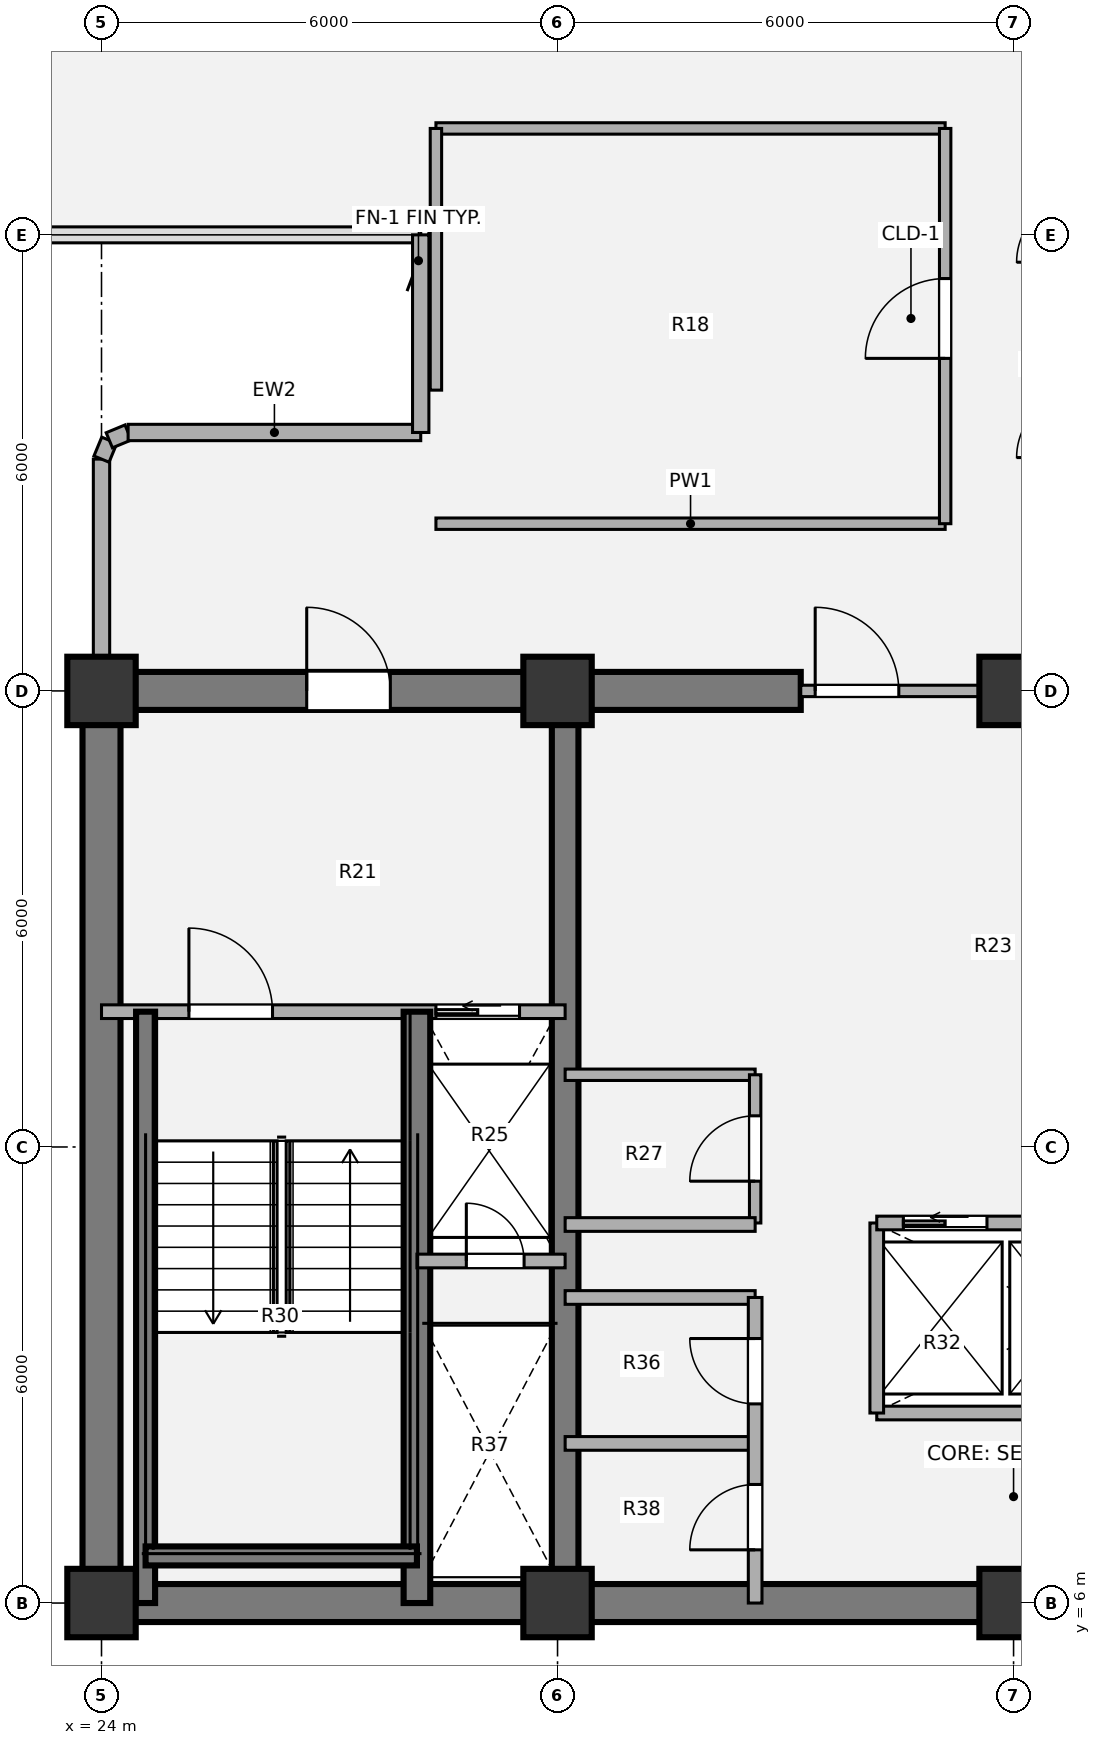
"""IFC4 building model, lengths in metres.
Left out: names, types, materials, properties, quantities, classifications, styles, units other than length and angle.
Written with IfcOpenShell. Run it as: python <this file> out.ifc"""

import sys

from ifc_helpers import new_model, si_unit, direction, frame, frame_2d, origin, origin_2d, place, context, subcontext, project, spatial, rectangle, extrude, source, transform, mapped, element, fill, save


model = new_model("IFC4")
c1 = context("Model", 3, precision=1e-05, world=origin(), true_north=direction((0.0, 1.0)))
c2 = subcontext(c1, "Body", "Model", "MODEL_VIEW")
j1 = project(units=[si_unit("LENGTHUNIT", "METRE"), si_unit("PLANEANGLEUNIT", "RADIAN")], contexts=[c1])
p1 = place(None, origin())
s1 = spatial("IfcSite", under=j1, at=p1, CompositionType="ELEMENT")
p2 = place(p1, origin())
s2 = spatial("IfcBuilding", under=s1, at=p2, CompositionType="ELEMENT")
p3 = place(p2, frame((0.0, 0.0, 142.74)))
s3 = spatial("IfcBuildingStorey", under=s2, at=p3, CompositionType="ELEMENT", Elevation=142.74)
m1 = source(origin(), c2, "Body", "SweptSolid", [
    extrude(rectangle(XDim=0.9, YDim=0.9, at=origin_2d()), origin(), (0.0, 0.0, 1.0), 3.78),
])
for number, where, z_axis, x_axis in (
    (1, (24.0, 6.0, 0.0), (0.0, 0.0, 1.0), (1.0, 0.0, 0.0)),
    (2, (30.0, 6.0, 0.0), (0.0, 0.0, 1.0), (1.0, 0.0, 0.0)),
    (3, (36.0, 6.0, 0.0), (0.0, 0.0, 1.0), (1.0, 0.0, 0.0)),
    (4, (24.0, 18.0, 0.0), (0.0, 0.0, 1.0), (1.0, 0.0, 0.0)),
    (5, (30.0, 18.0, 0.0), (0.0, 0.0, 1.0), (1.0, 0.0, 0.0)),
    (6, (36.0, 18.0, 0.0), (0.0, 0.0, 1.0), (1.0, 0.0, 0.0)),
):
    element("IfcColumn", number, at=place(p3, frame(where, z_axis=z_axis, x_axis=x_axis)), inside=s3, PredefinedType="COLUMN", context=c2, shape_type="MappedRepresentation", body=[
        mapped(m1, transform((0.0, 0.0, 0.0), x_axis=(1.0, 0.0, 0.0), y_axis=(0.0, 1.0, 0.0), z_axis=(0.0, 0.0, 1.0), scale=1.0)),
    ])
p4 = place(p3, frame((48.25, 6.0, 0.0), z_axis=(0.0, 0.0, 1.0), x_axis=(-1.0, 0.0, 0.0)))
e7 = element("IfcWall", 7, at=p4, inside=s3, PredefinedType="SHEAR", context=c2, shape_type="SweptSolid", body=[
    extrude(rectangle(XDim=24.5, YDim=0.5, at=frame_2d((12.25, 0.0))), origin(), (0.0, 0.0, 1.0), 3.78),
])
p5 = place(p3, frame((24.0, 6.0, 0.0), z_axis=(0.0, 0.0, 1.0), x_axis=(0.0, 1.0, 0.0)))
e8 = element("IfcWall", 8, at=p5, inside=s3, PredefinedType="SHEAR", context=c2, shape_type="SweptSolid", body=[
    extrude(rectangle(XDim=12.0, YDim=0.5, at=frame_2d((6.0, 0.0))), origin(), (0.0, 0.0, 1.0), 3.78),
])
p6 = place(p3, frame((23.75, 18.0, 0.0), z_axis=(0.0, 0.0, 1.0), x_axis=(1.0, 0.0, 0.0)))
e9 = element("IfcWall", 9, at=p6, inside=s3, PredefinedType="SHEAR", context=c2, shape_type="SweptSolid", body=[
    extrude(rectangle(XDim=9.45, YDim=0.5, at=frame_2d((4.725, 0.0))), origin(), (0.0, 0.0, 1.0), 3.78),
])
p7 = place(p6, frame((2.95, 0.0, 0.0)))
e10 = element("IfcOpeningElement", 10, at=p7, cuts=e9, PredefinedType="OPENING", context=c2, shape_type="SweptSolid", body=[
    extrude(rectangle(XDim=1.1, YDim=2.1, at=origin_2d()), frame((0.55, 0.26, 1.05), z_axis=(0.0, -1.0, 0.0), x_axis=(1.0, 0.0, 0.0)), (0.0, 0.0, 1.0), 0.52),
])
p8 = place(p3, frame((30.1, 6.0, 0.0), z_axis=(0.0, 0.0, 1.0), x_axis=(0.0, 1.0, 0.0)))
e11 = element("IfcWall", 11, at=p8, inside=s3, PredefinedType="SHEAR", context=c2, shape_type="SweptSolid", body=[
    extrude(rectangle(XDim=12.0, YDim=0.35, at=frame_2d((6.0, 0.0))), origin(), (0.0, 0.0, 1.0), 3.78),
])
p9 = place(p3, frame((24.0, 18.43, 0.0), z_axis=(0.0, 0.0, 1.0), x_axis=(0.0, 1.0, 0.0)))
e12 = element("IfcWall", 12, at=p9, inside=s3, PredefinedType="SOLIDWALL", context=c2, shape_type="SweptSolid", body=[
    extrude(rectangle(XDim=2.62, YDim=0.215, at=frame_2d((1.31, 0.0))), origin(), (0.0, 0.0, 1.0), 3.372),
])
p10 = place(p3, frame((24.0, 21.05, 0.0), z_axis=(0.0, 0.0, 1.0), x_axis=(0.382673670509, 0.923883575944, 0.0)))
e13 = element("IfcWall", 13, at=p10, inside=s3, PredefinedType="SOLIDWALL", context=c2, shape_type="SweptSolid", body=[
    extrude(rectangle(XDim=0.268, YDim=0.215, at=frame_2d((0.134, 0.0))), origin(), (0.0, 0.0, 1.0), 3.372),
])
p11 = place(p3, frame((24.103, 21.298, 0.0), z_axis=(0.0, 0.0, 1.0), x_axis=(0.924205486139, 0.381895560841, 0.0)))
e14 = element("IfcWall", 14, at=p11, inside=s3, PredefinedType="SOLIDWALL", context=c2, shape_type="SweptSolid", body=[
    extrude(rectangle(XDim=0.268, YDim=0.215, at=frame_2d((0.134, 0.0))), origin(), (0.0, 0.0, 1.0), 3.372),
])
p12 = place(p3, frame((24.35, 21.4, 0.0), z_axis=(0.0, 0.0, 1.0), x_axis=(1.0, 0.0, 0.0)))
e15 = element("IfcWall", 15, at=p12, inside=s3, PredefinedType="SOLIDWALL", context=c2, shape_type="SweptSolid", body=[
    extrude(rectangle(XDim=3.85, YDim=0.215, at=frame_2d((1.925, 0.0))), origin(), (0.0, 0.0, 1.0), 3.372),
])
p13 = place(p3, frame((28.2, 21.4, 0.0), z_axis=(0.0, 0.0, 1.0), x_axis=(0.0, 1.0, 0.0)))
e16 = element("IfcWall", 16, at=p13, inside=s3, PredefinedType="SOLIDWALL", context=c2, shape_type="SweptSolid", body=[
    extrude(rectangle(XDim=2.6, YDim=0.215, at=frame_2d((1.3, 0.0))), origin(), (0.0, 0.0, 1.0), 3.372),
])
p14 = place(p3, frame((30.1, 12.95, 0.0), z_axis=(0.0, 0.0, 1.0), x_axis=(1.0, 0.0, 0.0)))
e17 = element("IfcWall", 17, at=p14, inside=s3, PredefinedType="PARTITIONING", context=c2, shape_type="SweptSolid", body=[
    extrude(rectangle(XDim=2.5, YDim=0.15, at=frame_2d((1.25, 0.0))), origin(), (0.0, 0.0, 1.0), 3.342),
])
p15 = place(p3, frame((32.6, 11.0, 0.0), z_axis=(0.0, 0.0, 1.0), x_axis=(0.0, 1.0, 0.0)))
e18 = element("IfcWall", 18, at=p15, inside=s3, PredefinedType="PARTITIONING", context=c2, shape_type="SweptSolid", body=[
    extrude(rectangle(XDim=1.95, YDim=0.15, at=frame_2d((0.975, 0.0))), origin(), (0.0, 0.0, 1.0), 3.342),
])
p16 = place(p15, frame((0.55, 0.0, 0.0)))
e19 = element("IfcOpeningElement", 19, at=p16, cuts=e18, PredefinedType="OPENING", context=c2, shape_type="SweptSolid", body=[
    extrude(rectangle(XDim=0.86, YDim=2.1, at=origin_2d()), frame((0.43, 0.085, 1.05), z_axis=(0.0, -1.0, 0.0), x_axis=(1.0, 0.0, 0.0)), (0.0, 0.0, 1.0), 0.17),
])
p17 = place(p3, frame((34.2, 8.5, 0.0), z_axis=(0.0, 0.0, 1.0), x_axis=(1.0, 0.0, 0.0)))
e20 = element("IfcWall", 20, at=p17, inside=s3, PredefinedType="PARTITIONING", context=c2, shape_type="SweptSolid", body=[
    extrude(rectangle(XDim=5.15, YDim=0.18, at=frame_2d((2.575, 0.0))), origin(), (0.0, 0.0, 1.0), 3.342),
])
for number, where, z_axis, x_axis in (
    (21, (34.2, 8.5, 0.0), (0.0, 0.0, 1.0), (0.0, 1.0, 0.0)),
    (22, (30.1, 10.98, 0.0), (0.0, 0.0, 1.0), (1.0, 0.0, 0.0)),
    (23, (30.1, 8.1, 0.0), (0.0, 0.0, 1.0), (1.0, 0.0, 0.0)),
    (24, (30.1, 10.02, 0.0), (0.0, 0.0, 1.0), (1.0, 0.0, 0.0)),
):
    element("IfcWall", number, at=place(p3, frame(where, z_axis=z_axis, x_axis=x_axis)), inside=s3, PredefinedType="PARTITIONING", context=c2, shape_type="SweptSolid", body=[
        extrude(rectangle(XDim=2.5, YDim=0.18, at=frame_2d((1.25, 0.0))), origin(), (0.0, 0.0, 1.0), 3.342),
    ])
p18 = place(p3, frame((32.6, 6.0, 0.0), z_axis=(0.0, 0.0, 1.0), x_axis=(0.0, 1.0, 0.0)))
e25 = element("IfcWall", 25, at=p18, inside=s3, PredefinedType="PARTITIONING", context=c2, shape_type="SweptSolid", body=[
    extrude(rectangle(XDim=4.02, YDim=0.18, at=frame_2d((2.01, 0.0))), origin(), (0.0, 0.0, 1.0), 3.342),
])
p19 = place(p18, frame((0.7, 0.0, 0.0)))
e26 = element("IfcOpeningElement", 26, at=p19, cuts=e25, PredefinedType="OPENING", context=c2, shape_type="SweptSolid", body=[
    extrude(rectangle(XDim=0.86, YDim=2.1, at=origin_2d()), frame((0.43, 0.1, 1.05), z_axis=(0.0, -1.0, 0.0), x_axis=(1.0, 0.0, 0.0)), (0.0, 0.0, 1.0), 0.2),
])
p20 = place(p18, frame((2.62, 0.0, 0.0)))
e27 = element("IfcOpeningElement", 27, at=p20, cuts=e25, PredefinedType="OPENING", context=c2, shape_type="SweptSolid", body=[
    extrude(rectangle(XDim=0.86, YDim=2.1, at=origin_2d()), frame((0.43, 0.1, 1.05), z_axis=(0.0, -1.0, 0.0), x_axis=(1.0, 0.0, 0.0)), (0.0, 0.0, 1.0), 0.2),
])
p21 = place(p3, frame((33.2, 18.0, 0.0), z_axis=(0.0, 0.0, 1.0), x_axis=(1.0, 0.0, 0.0)))
e28 = element("IfcWall", 28, at=p21, inside=s3, PredefinedType="PARTITIONING", context=c2, shape_type="SweptSolid", body=[
    extrude(rectangle(XDim=5.6, YDim=0.15, at=frame_2d((2.8, 0.0))), origin(), (0.0, 0.0, 1.0), 2.157),
])
p22 = place(p21, frame((0.19, 0.0, 0.0)))
e29 = element("IfcOpeningElement", 29, at=p22, cuts=e28, PredefinedType="OPENING", context=c2, shape_type="SweptSolid", body=[
    extrude(rectangle(XDim=1.1, YDim=2.097, at=origin_2d()), frame((0.55, 0.085, 1.048), z_axis=(0.0, -1.0, 0.0), x_axis=(1.0, 0.0, 0.0)), (0.0, 0.0, 1.0), 0.17),
])
p23 = place(p21, frame((4.31, 0.0, 0.0)))
e30 = element("IfcOpeningElement", 30, at=p23, cuts=e28, PredefinedType="OPENING", context=c2, shape_type="SweptSolid", body=[
    extrude(rectangle(XDim=1.1, YDim=2.097, at=origin_2d()), frame((0.55, 0.085, 1.048), z_axis=(0.0, -1.0, 0.0), x_axis=(1.0, 0.0, 0.0)), (0.0, 0.0, 1.0), 0.17),
])
p24 = place(p3, frame((24.0, 13.78, 0.0), z_axis=(0.0, 0.0, 1.0), x_axis=(1.0, 0.0, 0.0)))
e31 = element("IfcWall", 31, at=p24, inside=s3, PredefinedType="PARTITIONING", context=c2, shape_type="SweptSolid", body=[
    extrude(rectangle(XDim=6.1, YDim=0.18, at=frame_2d((3.05, 0.0))), origin(), (0.0, 0.0, 1.0), 3.342),
])
p25 = place(p24, frame((1.15, 0.0, 0.0)))
e32 = element("IfcOpeningElement", 32, at=p25, cuts=e31, PredefinedType="OPENING", context=c2, shape_type="SweptSolid", body=[
    extrude(rectangle(XDim=1.1, YDim=2.1, at=origin_2d()), frame((0.55, 0.1, 1.05), z_axis=(0.0, -1.0, 0.0), x_axis=(1.0, 0.0, 0.0)), (0.0, 0.0, 1.0), 0.2),
])
p26 = place(p24, frame((4.4, 0.0, 0.0)))
e33 = element("IfcOpeningElement", 33, at=p26, cuts=e31, PredefinedType="OPENING", context=c2, shape_type="SweptSolid", body=[
    extrude(rectangle(XDim=1.1, YDim=2.1, at=origin_2d()), frame((0.55, 0.1, 1.05), z_axis=(0.0, -1.0, 0.0), x_axis=(1.0, 0.0, 0.0)), (0.0, 0.0, 1.0), 0.2),
])
p27 = place(p3, frame((28.15, 6.0, 0.0), z_axis=(0.0, 0.0, 1.0), x_axis=(0.0, 1.0, 0.0)))
e34 = element("IfcWall", 34, at=p27, inside=s3, PredefinedType="SHEAR", context=c2, shape_type="SweptSolid", body=[
    extrude(rectangle(XDim=7.78, YDim=0.35, at=frame_2d((3.89, 0.0))), origin(), (0.0, 0.0, 1.0), 3.692),
])
p28 = place(p3, frame((24.58, 6.0, 0.0), z_axis=(0.0, 0.0, 1.0), x_axis=(0.0, 1.0, 0.0)))
e35 = element("IfcWall", 35, at=p28, inside=s3, PredefinedType="SHEAR", context=c2, shape_type="SweptSolid", body=[
    extrude(rectangle(XDim=7.78, YDim=0.25, at=frame_2d((3.89, 0.0))), origin(), (0.0, 0.0, 1.0), 3.692),
])
p29 = place(p3, frame((24.58, 6.62, 0.0), z_axis=(0.0, 0.0, 1.0), x_axis=(1.0, 0.0, 0.0)))
e36 = element("IfcWall", 36, at=p29, inside=s3, PredefinedType="SHEAR", context=c2, shape_type="SweptSolid", body=[
    extrude(rectangle(XDim=3.57, YDim=0.25, at=frame_2d((1.785, 0.0))), origin(), (0.0, 0.0, 1.0), 3.692),
])
p30 = place(p3, frame((28.15, 10.5, 0.0), z_axis=(0.0, 0.0, 1.0), x_axis=(1.0, 0.0, 0.0)))
e37 = element("IfcWall", 37, at=p30, inside=s3, PredefinedType="PARTITIONING", context=c2, shape_type="SweptSolid", body=[
    extrude(rectangle(XDim=1.95, YDim=0.18, at=frame_2d((0.975, 0.0))), origin(), (0.0, 0.0, 1.0), 3.342),
])
p31 = place(p30, frame((0.65, 0.0, 0.0)))
e38 = element("IfcOpeningElement", 38, at=p31, cuts=e37, PredefinedType="OPENING", context=c2, shape_type="SweptSolid", body=[
    extrude(rectangle(XDim=0.76, YDim=2.05, at=origin_2d()), frame((0.38, 0.1, 1.025), z_axis=(0.0, -1.0, 0.0), x_axis=(1.0, 0.0, 0.0)), (0.0, 0.0, 1.0), 0.2),
])
p32 = place(p3, frame((34.2, 11.0, 0.0), z_axis=(0.0, 0.0, 1.0), x_axis=(1.0, 0.0, 0.0)))
e39 = element("IfcWall", 39, at=p32, inside=s3, PredefinedType="PARTITIONING", context=c2, shape_type="SweptSolid", body=[
    extrude(rectangle(XDim=5.15, YDim=0.18, at=frame_2d((2.575, 0.0))), origin(), (0.0, 0.0, 1.0), 3.342),
])
p33 = place(p32, frame((0.35, 0.0, 0.0)))
e40 = element("IfcOpeningElement", 40, at=p33, cuts=e39, PredefinedType="OPENING", context=c2, shape_type="SweptSolid", body=[
    extrude(rectangle(XDim=1.1, YDim=2.1, at=origin_2d()), frame((0.55, 0.1, 1.05), z_axis=(0.0, -1.0, 0.0), x_axis=(1.0, 0.0, 0.0)), (0.0, 0.0, 1.0), 0.2),
])
p34 = place(p32, frame((2.05, 0.0, 0.0)))
e41 = element("IfcOpeningElement", 41, at=p34, cuts=e39, PredefinedType="OPENING", context=c2, shape_type="SweptSolid", body=[
    extrude(rectangle(XDim=1.1, YDim=2.1, at=origin_2d()), frame((0.55, 0.1, 1.05), z_axis=(0.0, -1.0, 0.0), x_axis=(1.0, 0.0, 0.0)), (0.0, 0.0, 1.0), 0.2),
])
p35 = place(p32, frame((3.7, 0.0, 0.0)))
e42 = element("IfcOpeningElement", 42, at=p35, cuts=e39, PredefinedType="OPENING", context=c2, shape_type="SweptSolid", body=[
    extrude(rectangle(XDim=1.1, YDim=2.1, at=origin_2d()), frame((0.55, 0.1, 1.05), z_axis=(0.0, -1.0, 0.0), x_axis=(1.0, 0.0, 0.0)), (0.0, 0.0, 1.0), 0.2),
])
for number, where, z_axis, x_axis in (
    (43, (28.4, 20.2, 0.0), (0.0, 0.0, 1.0), (1.0, 0.0, 0.0)),
    (44, (28.4, 25.4, 0.0), (0.0, 0.0, 1.0), (1.0, 0.0, 0.0)),
):
    element("IfcWall", number, at=place(p3, frame(where, z_axis=z_axis, x_axis=x_axis)), inside=s3, PredefinedType="PARTITIONING", context=c2, shape_type="SweptSolid", body=[
        extrude(rectangle(XDim=6.7, YDim=0.15, at=frame_2d((3.35, 0.0))), origin(), (0.0, 0.0, 1.0), 3.342),
    ])
p36 = place(p3, frame((28.4, 21.957, 0.0), z_axis=(0.0, 0.0, 1.0), x_axis=(0.0, 1.0, 0.0)))
e45 = element("IfcWall", 45, at=p36, inside=s3, PredefinedType="PARTITIONING", context=c2, shape_type="SweptSolid", body=[
    extrude(rectangle(XDim=3.443, YDim=0.15, at=frame_2d((1.721, 0.0))), origin(), (0.0, 0.0, 1.0), 3.342),
])
p37 = place(p3, frame((35.1, 20.2, 0.0), z_axis=(0.0, 0.0, 1.0), x_axis=(0.0, 1.0, 0.0)))
e46 = element("IfcWall", 46, at=p37, inside=s3, PredefinedType="PARTITIONING", context=c2, shape_type="SweptSolid", body=[
    extrude(rectangle(XDim=5.2, YDim=0.15, at=frame_2d((2.6, 0.0))), origin(), (0.0, 0.0, 1.0), 3.342),
])
p38 = place(p37, frame((2.175, 0.0, 0.0)))
e47 = element("IfcOpeningElement", 47, at=p38, cuts=e46, PredefinedType="OPENING", context=c2, shape_type="SweptSolid", body=[
    extrude(rectangle(XDim=1.05, YDim=2.1, at=origin_2d()), frame((0.525, 0.085, 1.05), z_axis=(0.0, -1.0, 0.0), x_axis=(1.0, 0.0, 0.0)), (0.0, 0.0, 1.0), 0.17),
])
m2 = source(origin(), c2, "Body", "SweptSolid", [
    extrude(rectangle(XDim=0.86, YDim=2.1, at=origin_2d()), frame((0.43, 0.025, 1.05), z_axis=(0.0, -1.0, 0.0), x_axis=(1.0, 0.0, 0.0)), (0.0, 0.0, 1.0), 0.05),
])
p39 = place(p16, origin())
e48 = element("IfcDoor", 48, at=p39, inside=s3, OperationType="SINGLE_SWING_LEFT", PredefinedType="DOOR", context=c2, shape_type="MappedRepresentation", body=[
    mapped(m2, transform((0.0, 0.0, 0.0), x_axis=(1.0, 0.0, 0.0), y_axis=(0.0, 1.0, 0.0), z_axis=(0.0, 0.0, 1.0), scale=1.0)),
])
fill(e19, e48)
p40 = place(p19, origin())
e49 = element("IfcDoor", 49, at=p40, inside=s3, OperationType="SINGLE_SWING_LEFT", PredefinedType="DOOR", context=c2, shape_type="MappedRepresentation", body=[
    mapped(m2, transform((0.0, 0.0, 0.0), x_axis=(1.0, 0.0, 0.0), y_axis=(0.0, 1.0, 0.0), z_axis=(0.0, 0.0, 1.0), scale=1.0)),
])
fill(e26, e49)
p41 = place(p20, origin())
e50 = element("IfcDoor", 50, at=p41, inside=s3, OperationType="SINGLE_SWING_RIGHT", PredefinedType="DOOR", context=c2, shape_type="MappedRepresentation", body=[
    mapped(m2, transform((0.0, 0.0, 0.0), x_axis=(1.0, 0.0, 0.0), y_axis=(0.0, 1.0, 0.0), z_axis=(0.0, 0.0, 1.0), scale=1.0)),
])
fill(e27, e50)
m3 = source(origin(), c2, "Body", "SweptSolid", [
    extrude(rectangle(XDim=1.1, YDim=2.097, at=origin_2d()), frame((0.55, 0.025, 1.048), z_axis=(0.0, -1.0, 0.0), x_axis=(1.0, 0.0, 0.0)), (0.0, 0.0, 1.0), 0.05),
])
p42 = place(p22, origin())
e51 = element("IfcDoor", 51, at=p42, inside=s3, OperationType="SINGLE_SWING_LEFT", PredefinedType="DOOR", context=c2, shape_type="MappedRepresentation", body=[
    mapped(m3, transform((0.0, 0.0, 0.0), x_axis=(1.0, 0.0, 0.0), y_axis=(0.0, 1.0, 0.0), z_axis=(0.0, 0.0, 1.0), scale=1.0)),
])
fill(e29, e51)
m4 = source(origin(), c2, "Body", "SweptSolid", [
    extrude(rectangle(XDim=1.1, YDim=2.1, at=origin_2d()), frame((0.55, 0.025, 1.05), z_axis=(0.0, -1.0, 0.0), x_axis=(1.0, 0.0, 0.0)), (0.0, 0.0, 1.0), 0.05),
])
p43 = place(p25, origin())
e52 = element("IfcDoor", 52, at=p43, inside=s3, OperationType="SINGLE_SWING_LEFT", PredefinedType="DOOR", context=c2, shape_type="MappedRepresentation", body=[
    mapped(m4, transform((0.0, 0.0, 0.0), x_axis=(1.0, 0.0, 0.0), y_axis=(0.0, 1.0, 0.0), z_axis=(0.0, 0.0, 1.0), scale=1.0)),
])
fill(e32, e52)
m5 = source(origin(), c2, "Body", "SweptSolid", [
    extrude(rectangle(XDim=1.1, YDim=2.1, at=origin_2d()), frame((0.55, 0.025, 1.05), z_axis=(0.0, -1.0, 0.0), x_axis=(1.0, 0.0, 0.0)), (0.0, 0.0, 1.0), 0.05),
])
p44 = place(p26, origin())
e53 = element("IfcDoor", 53, at=p44, inside=s3, OperationType="SLIDING_TO_LEFT", PredefinedType="DOOR", context=c2, shape_type="MappedRepresentation", body=[
    mapped(m5, transform((0.0, 0.0, 0.0), x_axis=(1.0, 0.0, 0.0), y_axis=(0.0, 1.0, 0.0), z_axis=(0.0, 0.0, 1.0), scale=1.0)),
])
fill(e33, e53)
m6 = source(origin(), c2, "Body", "SweptSolid", [
    extrude(rectangle(XDim=0.76, YDim=2.05, at=origin_2d()), frame((0.38, 0.025, 1.025), z_axis=(0.0, -1.0, 0.0), x_axis=(1.0, 0.0, 0.0)), (0.0, 0.0, 1.0), 0.05),
])
p45 = place(p31, origin())
e54 = element("IfcDoor", 54, at=p45, inside=s3, OperationType="SINGLE_SWING_LEFT", PredefinedType="DOOR", context=c2, shape_type="MappedRepresentation", body=[
    mapped(m6, transform((0.0, 0.0, 0.0), x_axis=(1.0, 0.0, 0.0), y_axis=(0.0, 1.0, 0.0), z_axis=(0.0, 0.0, 1.0), scale=1.0)),
])
fill(e38, e54)
m7 = source(origin(), c2, "Body", "SweptSolid", [
    extrude(rectangle(XDim=1.1, YDim=2.1, at=origin_2d()), frame((0.55, 0.025, 1.05), z_axis=(0.0, -1.0, 0.0), x_axis=(1.0, 0.0, 0.0)), (0.0, 0.0, 1.0), 0.05),
])
p46 = place(p7, origin())
e55 = element("IfcDoor", 55, at=p46, inside=s3, OperationType="SINGLE_SWING_LEFT", PredefinedType="DOOR", context=c2, shape_type="MappedRepresentation", body=[
    mapped(m7, transform((0.0, 0.0, 0.0), x_axis=(1.0, 0.0, 0.0), y_axis=(0.0, 1.0, 0.0), z_axis=(0.0, 0.0, 1.0), scale=1.0)),
])
fill(e10, e55)
p47 = place(p33, origin())
e56 = element("IfcDoor", 56, at=p47, inside=s3, OperationType="SLIDING_TO_LEFT", PredefinedType="DOOR", context=c2, shape_type="MappedRepresentation", body=[
    mapped(m5, transform((0.0, 0.0, 0.0), x_axis=(1.0, 0.0, 0.0), y_axis=(0.0, 1.0, 0.0), z_axis=(0.0, 0.0, 1.0), scale=1.0)),
])
fill(e40, e56)
m8 = source(origin(), c2, "Body", "SweptSolid", [
    extrude(rectangle(XDim=1.05, YDim=2.1, at=origin_2d()), frame((0.525, 0.025, 1.05), z_axis=(0.0, -1.0, 0.0), x_axis=(1.0, 0.0, 0.0)), (0.0, 0.0, 1.0), 0.05),
])
p48 = place(p38, origin())
e57 = element("IfcDoor", 57, at=p48, inside=s3, OperationType="SINGLE_SWING_LEFT", PredefinedType="DOOR", context=c2, shape_type="MappedRepresentation", body=[
    mapped(m8, transform((0.0, 0.0, 0.0), x_axis=(1.0, 0.0, 0.0), y_axis=(0.0, 1.0, 0.0), z_axis=(0.0, 0.0, 1.0), scale=1.0)),
])
fill(e47, e57)
save(model, sys.argv[1])
